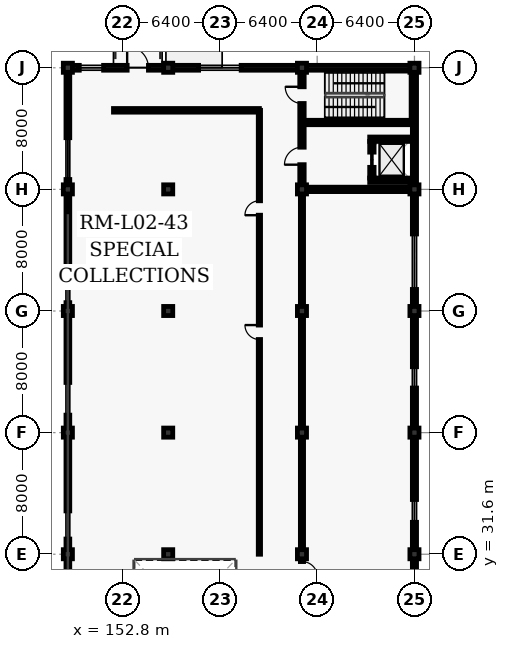
"""IFC4 building model, lengths in metres.
Left out: names, types, materials, properties, quantities, classifications, styles, units other than length and angle.
Written with IfcOpenShell. Run it as: python <this file> out.ifc"""

import sys

from ifc_helpers import new_model, si_unit, direction, frame, frame_2d, origin, origin_2d, place, context, subcontext, project, spatial, rectangle, extrude, element, fill, save


model = new_model("IFC4")
c1 = context("Model", 3, precision=1e-05, world=origin(), true_north=direction((0.0, 1.0)))
c2 = subcontext(c1, "Body", "Model", "MODEL_VIEW")
j1 = project(units=[si_unit("LENGTHUNIT", "METRE"), si_unit("PLANEANGLEUNIT", "RADIAN")], contexts=[c1])
p1 = place(None, origin())
s1 = spatial("IfcSite", under=j1, at=p1, CompositionType="ELEMENT")
p2 = place(p1, origin())
s2 = spatial("IfcBuilding", under=s1, at=p2, CompositionType="ELEMENT")
p3 = place(p2, frame((0.0, 0.0, 10.2)))
s3 = spatial("IfcBuildingStorey", under=s2, at=p3, CompositionType="ELEMENT", Elevation=10.2)
for number, where, z_axis, x_axis in (
    (1, (149.2, 31.6, 0.0), (0.0, 0.0, 1.0), (1.0, 0.0, 0.0)),
    (2, (149.2, 39.6, 0.0), (0.0, 0.0, 1.0), (1.0, 0.0, 0.0)),
    (3, (149.2, 47.6, 0.0), (0.0, 0.0, 1.0), (1.0, 0.0, 0.0)),
    (4, (149.2, 55.6, 0.0), (0.0, 0.0, 1.0), (1.0, 0.0, 0.0)),
    (5, (149.2, 63.6, 0.0), (0.0, 0.0, 1.0), (1.0, 0.0, 0.0)),
    (6, (155.8, 31.6, 0.0), (0.0, 0.0, 1.0), (1.0, 0.0, 0.0)),
    (7, (155.8, 39.6, 0.0), (0.0, 0.0, 1.0), (1.0, 0.0, 0.0)),
    (8, (155.8, 47.6, 0.0), (0.0, 0.0, 1.0), (1.0, 0.0, 0.0)),
    (9, (155.8, 55.6, 0.0), (0.0, 0.0, 1.0), (1.0, 0.0, 0.0)),
    (10, (155.8, 63.6, 0.0), (0.0, 0.0, 1.0), (1.0, 0.0, 0.0)),
    (11, (164.6, 31.6, 0.0), (0.0, 0.0, 1.0), (1.0, 0.0, 0.0)),
    (12, (164.6, 39.6, 0.0), (0.0, 0.0, 1.0), (1.0, 0.0, 0.0)),
    (13, (164.6, 47.6, 0.0), (0.0, 0.0, 1.0), (1.0, 0.0, 0.0)),
    (14, (164.6, 55.6, 0.0), (0.0, 0.0, 1.0), (1.0, 0.0, 0.0)),
    (15, (164.6, 63.6, 0.0), (0.0, 0.0, 1.0), (1.0, 0.0, 0.0)),
    (16, (172.0, 31.6, 0.0), (0.0, 0.0, 1.0), (1.0, 0.0, 0.0)),
    (17, (172.0, 39.6, 0.0), (0.0, 0.0, 1.0), (1.0, 0.0, 0.0)),
    (18, (172.0, 47.6, 0.0), (0.0, 0.0, 1.0), (1.0, 0.0, 0.0)),
    (19, (172.0, 55.6, 0.0), (0.0, 0.0, 1.0), (1.0, 0.0, 0.0)),
    (20, (172.0, 63.6, 0.0), (0.0, 0.0, 1.0), (1.0, 0.0, 0.0)),
):
    element("IfcColumn", number, at=place(p3, frame(where, z_axis=z_axis, x_axis=x_axis)), inside=s3, PredefinedType="COLUMN", context=c2, shape_type="SweptSolid", body=[
        extrude(rectangle(XDim=0.6, YDim=0.6, at=origin_2d()), origin(), (0.0, 0.0, 1.0), 5.4),
    ])
p4 = place(p3, frame((149.2, 15.6, 0.0), z_axis=(0.0, 0.0, 1.0), x_axis=(0.0, 1.0, 0.0)))
e21 = element("IfcWall", 21, at=p4, inside=s3, PredefinedType="SOLIDWALL", context=c2, shape_type="SweptSolid", body=[
    extrude(rectangle(XDim=48.0, YDim=0.25, at=frame_2d((24.0, 0.0))), origin(), (0.0, 0.0, 1.0), 4.3),
])
p5 = place(p4, frame((2.2, 0.0, 0.8)))
e22 = element("IfcOpeningElement", 22, at=p5, cuts=e21, PredefinedType="OPENING", context=c2, shape_type="SweptSolid", body=[
    extrude(rectangle(XDim=2.5, YDim=2.3, at=frame_2d((1.25, 1.15))), frame((0.0, 0.135, 0.0), z_axis=(0.0, -1.0, 0.0), x_axis=(1.0, 0.0, 0.0)), (0.0, 0.0, 1.0), 0.27),
])
p6 = place(p4, frame((9.6, 0.0, 0.8)))
e23 = element("IfcOpeningElement", 23, at=p6, cuts=e21, PredefinedType="OPENING", context=c2, shape_type="SweptSolid", body=[
    extrude(rectangle(XDim=1.6, YDim=2.75, at=frame_2d((0.8, 1.375))), frame((0.0, 0.135, 0.0), z_axis=(0.0, -1.0, 0.0), x_axis=(1.0, 0.0, 0.0)), (0.0, 0.0, 1.0), 0.27),
])
p7 = place(p4, frame((17.0, 0.0, 0.8)))
e24 = element("IfcOpeningElement", 24, at=p7, cuts=e21, PredefinedType="OPENING", context=c2, shape_type="SweptSolid", body=[
    extrude(rectangle(XDim=1.85, YDim=2.75, at=frame_2d((0.925, 1.375))), frame((0.0, 0.135, 0.0), z_axis=(0.0, -1.0, 0.0), x_axis=(1.0, 0.0, 0.0)), (0.0, 0.0, 1.0), 0.27),
])
p8 = place(p4, frame((25.15, 0.0, 0.8)))
e25 = element("IfcOpeningElement", 25, at=p8, cuts=e21, PredefinedType="OPENING", context=c2, shape_type="SweptSolid", body=[
    extrude(rectangle(XDim=2.15, YDim=2.8, at=frame_2d((1.075, 1.4))), frame((0.0, 0.135, 0.0), z_axis=(0.0, -1.0, 0.0), x_axis=(1.0, 0.0, 0.0)), (0.0, 0.0, 1.0), 0.27),
])
p9 = place(p4, frame((32.55, 0.0, 0.8)))
e26 = element("IfcOpeningElement", 26, at=p9, cuts=e21, PredefinedType="OPENING", context=c2, shape_type="SweptSolid", body=[
    extrude(rectangle(XDim=2.45, YDim=2.8, at=frame_2d((1.225, 1.4))), frame((0.0, 0.135, 0.0), z_axis=(0.0, -1.0, 0.0), x_axis=(1.0, 0.0, 0.0)), (0.0, 0.0, 1.0), 0.27),
])
p10 = place(p4, frame((40.65, 0.0, 0.8)))
e27 = element("IfcOpeningElement", 27, at=p10, cuts=e21, PredefinedType="OPENING", context=c2, shape_type="SweptSolid", body=[
    extrude(rectangle(XDim=2.75, YDim=2.85, at=frame_2d((1.375, 1.425))), frame((0.0, 0.135, 0.0), z_axis=(0.0, -1.0, 0.0), x_axis=(1.0, 0.0, 0.0)), (0.0, 0.0, 1.0), 0.27),
])
p11 = place(p3, frame((149.2, 63.6, 0.0), z_axis=(0.0, 0.0, 1.0), x_axis=(1.0, 0.0, 0.0)))
e28 = element("IfcWall", 28, at=p11, inside=s3, PredefinedType="SOLIDWALL", context=c2, shape_type="SweptSolid", body=[
    extrude(rectangle(XDim=22.8, YDim=0.32, at=frame_2d((11.4, 0.0))), origin(), (0.0, 0.0, 1.0), 4.3),
])
p12 = place(p11, frame((0.75, 0.0, 0.9)))
e29 = element("IfcOpeningElement", 29, at=p12, cuts=e28, PredefinedType="OPENING", context=c2, shape_type="SweptSolid", body=[
    extrude(rectangle(XDim=1.6, YDim=1.65, at=frame_2d((0.8, 0.825))), frame((0.0, 0.17, 0.0), z_axis=(0.0, -1.0, 0.0), x_axis=(1.0, 0.0, 0.0)), (0.0, 0.0, 1.0), 0.34),
])
p13 = place(p11, frame((8.6, 0.0, 0.9)))
e30 = element("IfcOpeningElement", 30, at=p13, cuts=e28, PredefinedType="OPENING", context=c2, shape_type="SweptSolid", body=[
    extrude(rectangle(XDim=2.8, YDim=2.4, at=frame_2d((1.4, 1.2))), frame((0.0, 0.17, 0.0), z_axis=(0.0, -1.0, 0.0), x_axis=(1.0, 0.0, 0.0)), (0.0, 0.0, 1.0), 0.34),
])
p14 = place(p11, frame((3.9, 0.0, 0.0)))
e31 = element("IfcOpeningElement", 31, at=p14, cuts=e28, PredefinedType="OPENING", context=c2, shape_type="SweptSolid", body=[
    extrude(rectangle(XDim=1.4, YDim=2.25, at=frame_2d((0.7, 1.125))), frame((0.0, 0.17, 0.0), z_axis=(0.0, -1.0, 0.0), x_axis=(1.0, 0.0, 0.0)), (0.0, 0.0, 1.0), 0.34),
])
p15 = place(p3, frame((172.0, 63.6, 0.0), z_axis=(0.0, 0.0, 1.0), x_axis=(0.0, -1.0, 0.0)))
e32 = element("IfcWall", 32, at=p15, inside=s3, PredefinedType="SOLIDWALL", context=c2, shape_type="SweptSolid", body=[
    extrude(rectangle(XDim=56.0, YDim=0.275, at=frame_2d((28.0, 0.0))), origin(), (0.0, 0.0, 1.0), 4.3),
])
p16 = place(p15, frame((10.933, 0.0, 0.8)))
e33 = element("IfcOpeningElement", 33, at=p16, cuts=e32, PredefinedType="OPENING", context=c2, shape_type="SweptSolid", body=[
    extrude(rectangle(XDim=3.65, YDim=2.9, at=frame_2d((1.825, 1.45))), frame((0.0, 0.147, 0.0), z_axis=(0.0, -1.0, 0.0), x_axis=(1.0, 0.0, 0.0)), (0.0, 0.0, 1.0), 0.295),
])
p17 = place(p15, frame((19.667, 0.0, 0.8)))
e34 = element("IfcOpeningElement", 34, at=p17, cuts=e32, PredefinedType="OPENING", context=c2, shape_type="SweptSolid", body=[
    extrude(rectangle(XDim=1.4, YDim=2.1, at=frame_2d((0.7, 1.05))), frame((0.0, 0.147, 0.0), z_axis=(0.0, -1.0, 0.0), x_axis=(1.0, 0.0, 0.0)), (0.0, 0.0, 1.0), 0.295),
])
p18 = place(p15, frame((28.4, 0.0, 0.8)))
e35 = element("IfcOpeningElement", 35, at=p18, cuts=e32, PredefinedType="OPENING", context=c2, shape_type="SweptSolid", body=[
    extrude(rectangle(XDim=1.5, YDim=2.1, at=frame_2d((0.75, 1.05))), frame((0.0, 0.147, 0.0), z_axis=(0.0, -1.0, 0.0), x_axis=(1.0, 0.0, 0.0)), (0.0, 0.0, 1.0), 0.295),
])
p19 = place(p15, frame((37.133, 0.0, 0.8)))
e36 = element("IfcOpeningElement", 36, at=p19, cuts=e32, PredefinedType="OPENING", context=c2, shape_type="SweptSolid", body=[
    extrude(rectangle(XDim=1.6, YDim=2.1, at=frame_2d((0.8, 1.05))), frame((0.0, 0.147, 0.0), z_axis=(0.0, -1.0, 0.0), x_axis=(1.0, 0.0, 0.0)), (0.0, 0.0, 1.0), 0.295),
])
p20 = place(p15, frame((45.117, 0.0, 0.8)))
e37 = element("IfcOpeningElement", 37, at=p20, cuts=e32, PredefinedType="OPENING", context=c2, shape_type="SweptSolid", body=[
    extrude(rectangle(XDim=1.7, YDim=2.15, at=frame_2d((0.85, 1.075))), frame((0.0, 0.147, 0.0), z_axis=(0.0, -1.0, 0.0), x_axis=(1.0, 0.0, 0.0)), (0.0, 0.0, 1.0), 0.295),
])
p21 = place(p3, frame((164.902, 55.6, 0.0), z_axis=(0.0, 0.0, 1.0), x_axis=(1.0, 0.0, 0.0)))
e38 = element("IfcWall", 38, at=p21, inside=s3, PredefinedType="SHEAR", context=c2, shape_type="SweptSolid", body=[
    extrude(rectangle(XDim=6.796, YDim=0.29, at=frame_2d((3.398, 0.0))), origin(), (0.0, 0.0, 1.0), 5.15),
])
p22 = place(p3, frame((164.6, 55.902, 0.0), z_axis=(0.0, 0.0, 1.0), x_axis=(0.0, 1.0, 0.0)))
e39 = element("IfcWall", 39, at=p22, inside=s3, PredefinedType="SHEAR", context=c2, shape_type="SweptSolid", body=[
    extrude(rectangle(XDim=7.396, YDim=0.29, at=frame_2d((3.698, 0.0))), origin(), (0.0, 0.0, 1.0), 5.15),
])
p23 = place(p22, frame((5.348, 0.0, 0.0)))
e40 = element("IfcOpeningElement", 40, at=p23, cuts=e39, PredefinedType="OPENING", context=c2, shape_type="SweptSolid", body=[
    extrude(rectangle(XDim=1.1, YDim=2.15, at=frame_2d((0.55, 1.075))), frame((0.0, 0.155, 0.0), z_axis=(0.0, -1.0, 0.0), x_axis=(1.0, 0.0, 0.0)), (0.0, 0.0, 1.0), 0.31),
])
p24 = place(p22, frame((1.323, 0.0, 0.0)))
e41 = element("IfcOpeningElement", 41, at=p24, cuts=e39, PredefinedType="OPENING", context=c2, shape_type="SweptSolid", body=[
    extrude(rectangle(XDim=1.15, YDim=2.2, at=frame_2d((0.575, 1.1))), frame((0.0, 0.155, 0.0), z_axis=(0.0, -1.0, 0.0), x_axis=(1.0, 0.0, 0.0)), (0.0, 0.0, 1.0), 0.31),
])
p25 = place(p3, frame((164.745, 60.0, 0.0), z_axis=(0.0, 0.0, 1.0), x_axis=(1.0, 0.0, 0.0)))
e42 = element("IfcWall", 42, at=p25, inside=s3, PredefinedType="SHEAR", context=c2, shape_type="SweptSolid", body=[
    extrude(rectangle(XDim=7.11, YDim=0.29, at=frame_2d((3.555, 0.0))), origin(), (0.0, 0.0, 1.0), 5.15),
])
for number, where, z_axis, x_axis in (
    (43, (169.055, 56.2, 0.0), (0.0, 0.0, 1.0), (1.0, 0.0, 0.0)),
    (44, (169.055, 58.9, 0.0), (0.0, 0.0, 1.0), (1.0, 0.0, 0.0)),
):
    element("IfcWall", number, at=place(p3, frame(where, z_axis=z_axis, x_axis=x_axis)), inside=s3, PredefinedType="SHEAR", context=c2, shape_type="SweptSolid", body=[
        extrude(rectangle(XDim=2.89, YDim=0.29, at=frame_2d((1.445, 0.0))), origin(), (0.0, 0.0, 1.0), 5.15),
    ])
p26 = place(p3, frame((169.2, 56.345, 0.0), z_axis=(0.0, 0.0, 1.0), x_axis=(0.0, 1.0, 0.0)))
e45 = element("IfcWall", 45, at=p26, inside=s3, PredefinedType="SHEAR", context=c2, shape_type="SweptSolid", body=[
    extrude(rectangle(XDim=2.41, YDim=0.29, at=frame_2d((1.205, 0.0))), origin(), (0.0, 0.0, 1.0), 5.15),
])
p27 = place(p26, frame((0.705, 0.0, 0.0)))
e46 = element("IfcOpeningElement", 46, at=p27, cuts=e45, PredefinedType="OPENING", context=c2, shape_type="SweptSolid", body=[
    extrude(rectangle(XDim=1.0, YDim=2.15, at=frame_2d((0.5, 1.075))), frame((0.0, 0.155, 0.0), z_axis=(0.0, -1.0, 0.0), x_axis=(1.0, 0.0, 0.0)), (0.0, 0.0, 1.0), 0.31),
])
p28 = place(p3, frame((161.8, 31.6, 0.0), z_axis=(0.0, 0.0, 1.0), x_axis=(0.0, 1.0, 0.0)))
e47 = element("IfcWall", 47, at=p28, inside=s3, PredefinedType="PARTITIONING", context=c2, shape_type="SweptSolid", body=[
    extrude(rectangle(XDim=29.2, YDim=0.15, at=frame_2d((14.6, 0.0))), origin(), (0.0, 0.0, 1.0), 5.15),
])
p29 = place(p28, frame((14.125, 0.0, 0.0)))
e48 = element("IfcOpeningElement", 48, at=p29, cuts=e47, PredefinedType="OPENING", context=c2, shape_type="SweptSolid", body=[
    extrude(rectangle(XDim=0.95, YDim=2.1, at=frame_2d((0.475, 1.05))), frame((0.0, 0.085, 0.0), z_axis=(0.0, -1.0, 0.0), x_axis=(1.0, 0.0, 0.0)), (0.0, 0.0, 1.0), 0.17),
])
p30 = place(p28, frame((22.301, 0.0, 0.0)))
e49 = element("IfcOpeningElement", 49, at=p30, cuts=e47, PredefinedType="OPENING", context=c2, shape_type="SweptSolid", body=[
    extrude(rectangle(XDim=0.95, YDim=2.1, at=frame_2d((0.475, 1.05))), frame((0.0, 0.085, 0.0), z_axis=(0.0, -1.0, 0.0), x_axis=(1.0, 0.0, 0.0)), (0.0, 0.0, 1.0), 0.17),
])
p31 = place(p3, frame((161.8, 60.8, 0.0), z_axis=(0.0, 0.0, 1.0), x_axis=(-1.0, 0.0, 0.0)))
e50 = element("IfcWall", 50, at=p31, inside=s3, PredefinedType="PARTITIONING", context=c2, shape_type="SweptSolid", body=[
    extrude(rectangle(XDim=9.6, YDim=0.24, at=frame_2d((4.8, 0.0))), origin(), (0.0, 0.0, 1.0), 5.15),
])
p32 = place(p3, frame((164.6, 55.298, 0.0), z_axis=(0.0, 0.0, 1.0), x_axis=(0.0, -1.0, 0.0)))
e51 = element("IfcWall", 51, at=p32, inside=s3, PredefinedType="PARTITIONING", context=c2, shape_type="SweptSolid", body=[
    extrude(rectangle(XDim=47.396, YDim=0.21, at=frame_2d((23.698, 0.0))), origin(), (0.0, 0.0, 1.0), 4.3),
])
p33 = place(p32, frame((24.18, 0.0, 0.0)))
e52 = element("IfcOpeningElement", 52, at=p33, cuts=e51, PredefinedType="OPENING", context=c2, shape_type="SweptSolid", body=[
    extrude(rectangle(XDim=1.02, YDim=2.1, at=frame_2d((0.51, 1.05))), frame((0.0, 0.115, 0.0), z_axis=(0.0, -1.0, 0.0), x_axis=(1.0, 0.0, 0.0)), (0.0, 0.0, 1.0), 0.23),
])
p34 = place(p32, frame((36.269, 0.0, 0.0)))
e53 = element("IfcOpeningElement", 53, at=p34, cuts=e51, PredefinedType="OPENING", context=c2, shape_type="SweptSolid", body=[
    extrude(rectangle(XDim=1.4, YDim=2.25, at=frame_2d((0.7, 1.125))), frame((0.0, 0.115, 0.0), z_axis=(0.0, -1.0, 0.0), x_axis=(1.0, 0.0, 0.0)), (0.0, 0.0, 1.0), 0.23),
])
p35 = place(p7, origin())
e54 = element("IfcWindow", 54, at=p35, inside=s3, PartitioningType="SINGLE_PANEL", PredefinedType="WINDOW", context=c2, shape_type="SweptSolid", body=[
    extrude(rectangle(XDim=1.85, YDim=2.75, at=frame_2d((0.925, 1.375))), frame((0.0, 0.03, 0.0), z_axis=(0.0, -1.0, 0.0), x_axis=(1.0, 0.0, 0.0)), (0.0, 0.0, 1.0), 0.06),
])
fill(e24, e54)
p36 = place(p8, origin())
e55 = element("IfcWindow", 55, at=p36, inside=s3, PartitioningType="SINGLE_PANEL", PredefinedType="WINDOW", context=c2, shape_type="SweptSolid", body=[
    extrude(rectangle(XDim=2.15, YDim=2.8, at=frame_2d((1.075, 1.4))), frame((0.0, 0.03, 0.0), z_axis=(0.0, -1.0, 0.0), x_axis=(1.0, 0.0, 0.0)), (0.0, 0.0, 1.0), 0.06),
])
fill(e25, e55)
p37 = place(p9, origin())
e56 = element("IfcWindow", 56, at=p37, inside=s3, PartitioningType="SINGLE_PANEL", PredefinedType="WINDOW", context=c2, shape_type="SweptSolid", body=[
    extrude(rectangle(XDim=2.45, YDim=2.8, at=frame_2d((1.225, 1.4))), frame((0.0, 0.03, 0.0), z_axis=(0.0, -1.0, 0.0), x_axis=(1.0, 0.0, 0.0)), (0.0, 0.0, 1.0), 0.06),
])
fill(e26, e56)
p38 = place(p10, origin())
e57 = element("IfcWindow", 57, at=p38, inside=s3, PartitioningType="SINGLE_PANEL", PredefinedType="WINDOW", context=c2, shape_type="SweptSolid", body=[
    extrude(rectangle(XDim=2.75, YDim=2.85, at=frame_2d((1.375, 1.425))), frame((0.0, 0.03, 0.0), z_axis=(0.0, -1.0, 0.0), x_axis=(1.0, 0.0, 0.0)), (0.0, 0.0, 1.0), 0.06),
])
fill(e27, e57)
p39 = place(p12, origin())
e58 = element("IfcWindow", 58, at=p39, inside=s3, PartitioningType="SINGLE_PANEL", PredefinedType="WINDOW", context=c2, shape_type="SweptSolid", body=[
    extrude(rectangle(XDim=1.6, YDim=1.65, at=frame_2d((0.8, 0.825))), frame((0.0, 0.03, 0.0), z_axis=(0.0, -1.0, 0.0), x_axis=(1.0, 0.0, 0.0)), (0.0, 0.0, 1.0), 0.06),
])
fill(e29, e58)
p40 = place(p13, origin())
e59 = element("IfcWindow", 59, at=p40, inside=s3, PartitioningType="SINGLE_PANEL", PredefinedType="WINDOW", context=c2, shape_type="SweptSolid", body=[
    extrude(rectangle(XDim=2.8, YDim=2.4, at=frame_2d((1.4, 1.2))), frame((0.0, 0.03, 0.0), z_axis=(0.0, -1.0, 0.0), x_axis=(1.0, 0.0, 0.0)), (0.0, 0.0, 1.0), 0.06),
])
fill(e30, e59)
p41 = place(p16, origin())
e60 = element("IfcWindow", 60, at=p41, inside=s3, PartitioningType="SINGLE_PANEL", PredefinedType="WINDOW", context=c2, shape_type="SweptSolid", body=[
    extrude(rectangle(XDim=3.65, YDim=2.9, at=frame_2d((1.825, 1.45))), frame((0.0, 0.03, 0.0), z_axis=(0.0, -1.0, 0.0), x_axis=(1.0, 0.0, 0.0)), (0.0, 0.0, 1.0), 0.06),
])
fill(e33, e60)
p42 = place(p17, origin())
e61 = element("IfcWindow", 61, at=p42, inside=s3, PartitioningType="SINGLE_PANEL", PredefinedType="WINDOW", context=c2, shape_type="SweptSolid", body=[
    extrude(rectangle(XDim=1.4, YDim=2.1, at=frame_2d((0.7, 1.05))), frame((0.0, 0.03, 0.0), z_axis=(0.0, -1.0, 0.0), x_axis=(1.0, 0.0, 0.0)), (0.0, 0.0, 1.0), 0.06),
])
fill(e34, e61)
p43 = place(p18, origin())
e62 = element("IfcWindow", 62, at=p43, inside=s3, PartitioningType="SINGLE_PANEL", PredefinedType="WINDOW", context=c2, shape_type="SweptSolid", body=[
    extrude(rectangle(XDim=1.5, YDim=2.1, at=frame_2d((0.75, 1.05))), frame((0.0, 0.03, 0.0), z_axis=(0.0, -1.0, 0.0), x_axis=(1.0, 0.0, 0.0)), (0.0, 0.0, 1.0), 0.06),
])
fill(e35, e62)
p44 = place(p23, origin())
e63 = element("IfcDoor", 63, at=p44, inside=s3, OperationType="SINGLE_SWING_RIGHT", PredefinedType="DOOR", context=c2, shape_type="SweptSolid", body=[
    extrude(rectangle(XDim=1.1, YDim=2.15, at=frame_2d((0.55, 1.075))), frame((0.0, 0.025, 0.0), z_axis=(0.0, -1.0, 0.0), x_axis=(1.0, 0.0, 0.0)), (0.0, 0.0, 1.0), 0.05),
])
fill(e40, e63)
p45 = place(p24, origin())
e64 = element("IfcDoor", 64, at=p45, inside=s3, OperationType="SINGLE_SWING_LEFT", PredefinedType="DOOR", context=c2, shape_type="SweptSolid", body=[
    extrude(rectangle(XDim=1.15, YDim=2.2, at=frame_2d((0.575, 1.1))), frame((0.0, 0.025, 0.0), z_axis=(0.0, -1.0, 0.0), x_axis=(1.0, 0.0, 0.0)), (0.0, 0.0, 1.0), 0.05),
])
fill(e41, e64)
p46 = place(p27, origin())
e65 = element("IfcDoor", 65, at=p46, inside=s3, OperationType="SLIDING_TO_LEFT", PredefinedType="DOOR", context=c2, shape_type="SweptSolid", body=[
    extrude(rectangle(XDim=1.0, YDim=2.15, at=frame_2d((0.5, 1.075))), frame((0.0, 0.025, 0.0), z_axis=(0.0, -1.0, 0.0), x_axis=(1.0, 0.0, 0.0)), (0.0, 0.0, 1.0), 0.05),
])
fill(e46, e65)
p47 = place(p14, origin())
e66 = element("IfcDoor", 66, at=p47, inside=s3, OperationType="SINGLE_SWING_LEFT", PredefinedType="DOOR", context=c2, shape_type="SweptSolid", body=[
    extrude(rectangle(XDim=1.4, YDim=2.25, at=frame_2d((0.7, 1.125))), frame((0.0, 0.025, 0.0), z_axis=(0.0, -1.0, 0.0), x_axis=(1.0, 0.0, 0.0)), (0.0, 0.0, 1.0), 0.05),
])
fill(e31, e66)
p48 = place(p29, origin())
e67 = element("IfcDoor", 67, at=p48, inside=s3, OperationType="SINGLE_SWING_RIGHT", PredefinedType="DOOR", context=c2, shape_type="SweptSolid", body=[
    extrude(rectangle(XDim=0.95, YDim=2.1, at=frame_2d((0.475, 1.05))), frame((0.0, 0.025, 0.0), z_axis=(0.0, -1.0, 0.0), x_axis=(1.0, 0.0, 0.0)), (0.0, 0.0, 1.0), 0.05),
])
fill(e48, e67)
p49 = place(p30, origin())
e68 = element("IfcDoor", 68, at=p49, inside=s3, OperationType="SINGLE_SWING_LEFT", PredefinedType="DOOR", context=c2, shape_type="SweptSolid", body=[
    extrude(rectangle(XDim=0.95, YDim=2.1, at=frame_2d((0.475, 1.05))), frame((0.0, 0.025, 0.0), z_axis=(0.0, -1.0, 0.0), x_axis=(1.0, 0.0, 0.0)), (0.0, 0.0, 1.0), 0.05),
])
fill(e49, e68)
p50 = place(p33, origin())
e69 = element("IfcDoor", 69, at=p50, inside=s3, OperationType="SINGLE_SWING_RIGHT", PredefinedType="DOOR", context=c2, shape_type="SweptSolid", body=[
    extrude(rectangle(XDim=1.02, YDim=2.1, at=frame_2d((0.51, 1.05))), frame((0.0, 0.025, 0.0), z_axis=(0.0, -1.0, 0.0), x_axis=(1.0, 0.0, 0.0)), (0.0, 0.0, 1.0), 0.05),
])
fill(e52, e69)
save(model, sys.argv[1])
